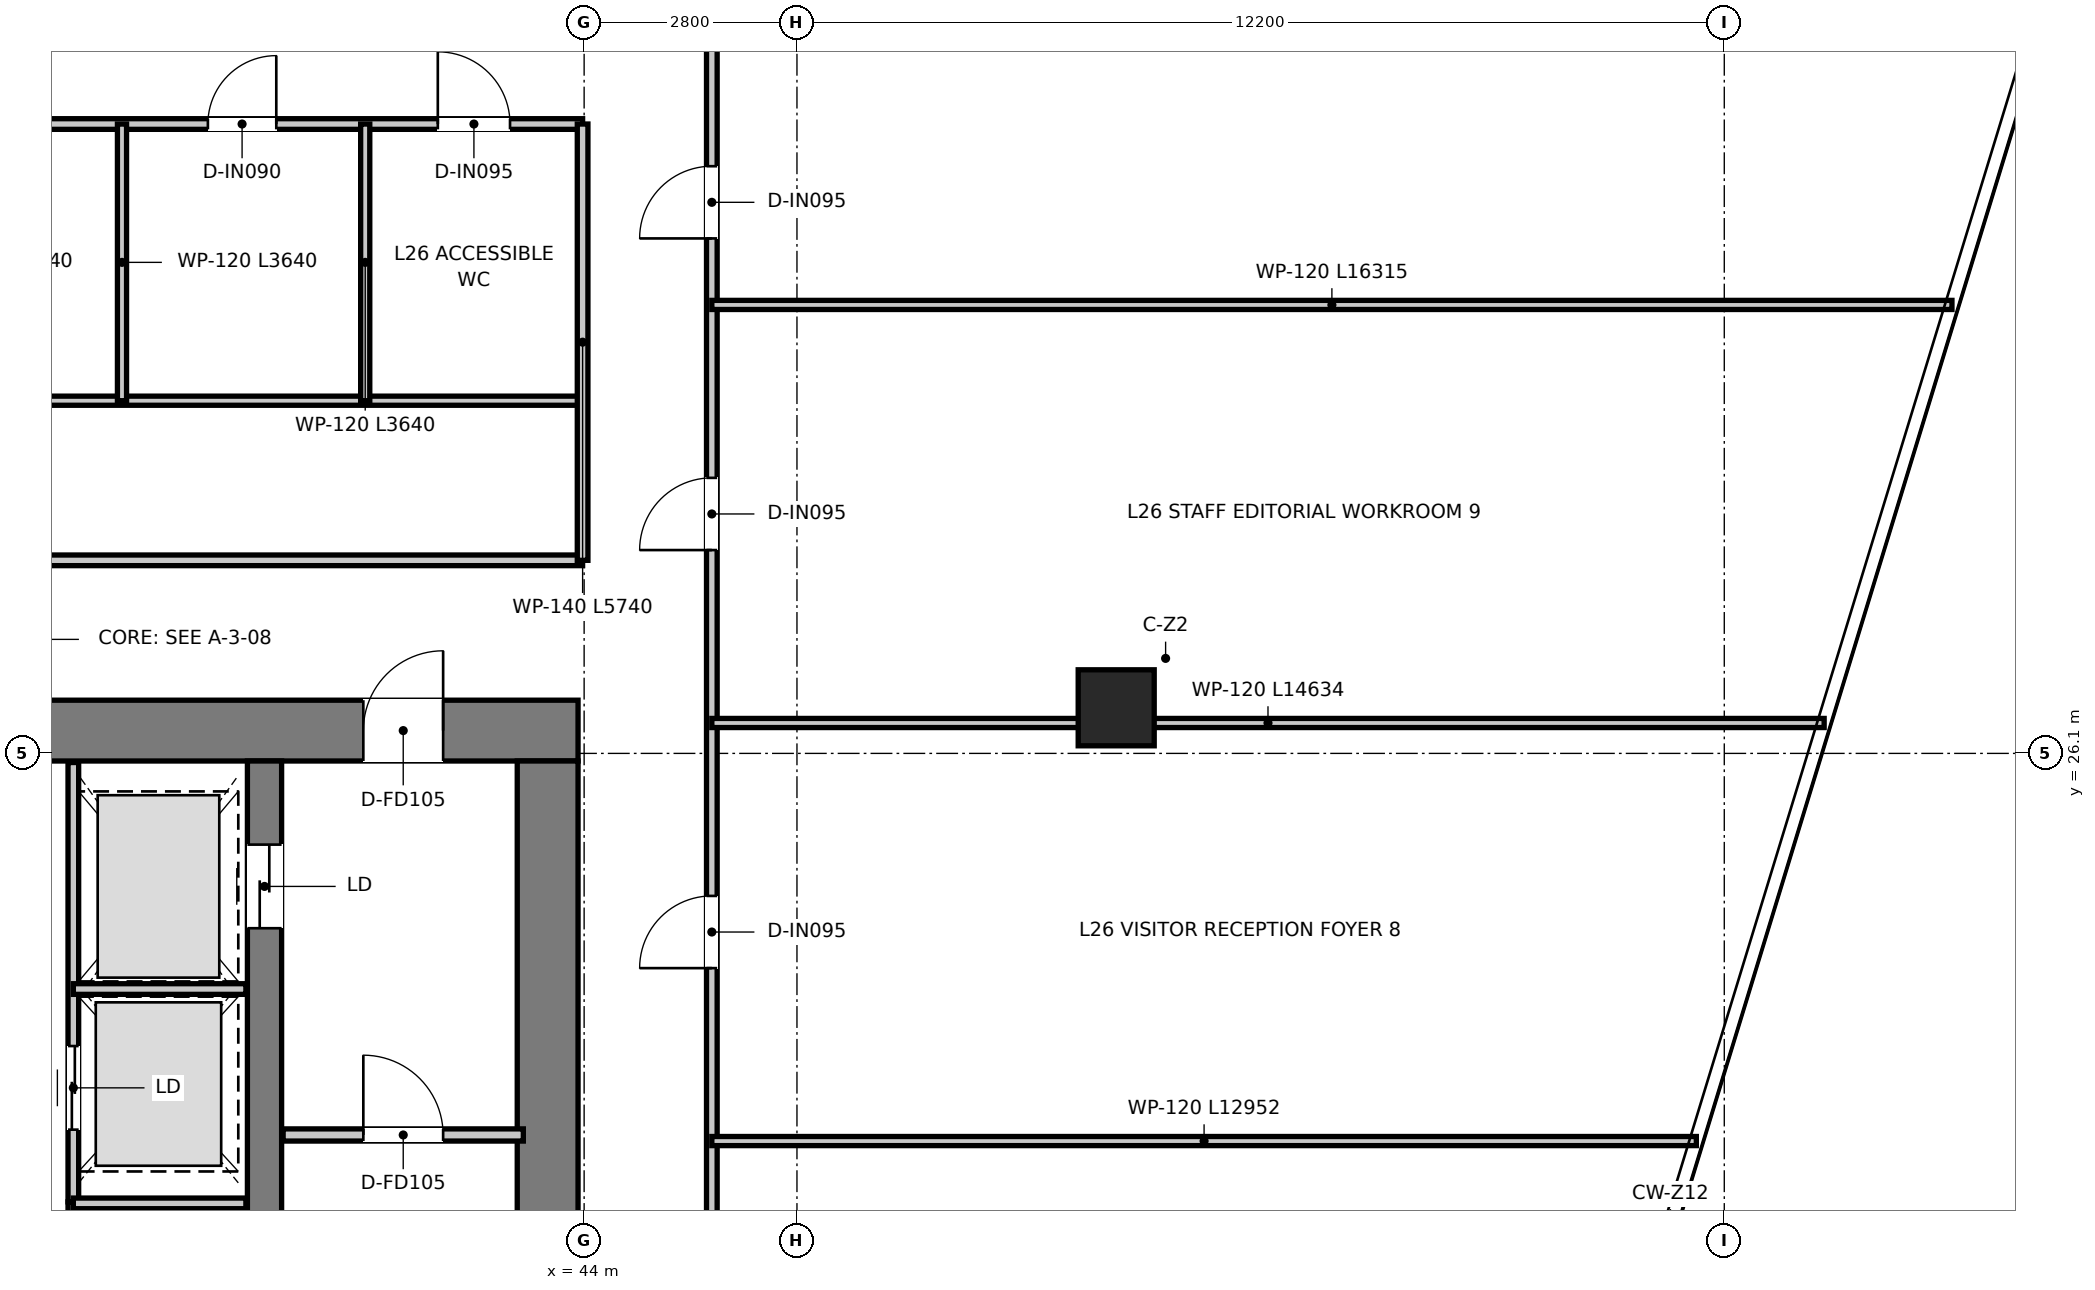
"""IFC4 building model, lengths in metres.
Left out: names, types, materials, properties, quantities, classifications, styles, units other than length and angle.
Written with IfcOpenShell. Run it as: python <this file> out.ifc"""

import sys

from ifc_helpers import new_model, si_unit, direction, frame, frame_2d, origin, origin_2d, place, context, subcontext, project, spatial, rectangle, extrude, source, transform, mapped, element, fill, save


model = new_model("IFC4")
c1 = context("Model", 3, precision=1e-05, world=origin(), true_north=direction((0.0, 1.0)))
c2 = subcontext(c1, "Body", "Model", "MODEL_VIEW")
j1 = project(units=[si_unit("LENGTHUNIT", "METRE"), si_unit("PLANEANGLEUNIT", "RADIAN")], contexts=[c1])
p1 = place(None, origin())
s1 = spatial("IfcSite", under=j1, at=p1, CompositionType="ELEMENT")
p2 = place(p1, origin())
s2 = spatial("IfcBuilding", under=s1, at=p2, CompositionType="ELEMENT")
p3 = place(p2, frame((0.0, 0.0, 109.8)))
s3 = spatial("IfcBuildingStorey", under=s2, at=p3, CompositionType="ELEMENT", Elevation=109.8)
p4 = place(p3, frame((28.08, 26.4, 0.0), z_axis=(0.0, 0.0, 1.0), x_axis=(1.0, 0.0, 0.0)))
e1 = element("IfcWall", 1, at=p4, inside=s3, PredefinedType="SHEAR", context=c2, shape_type="SweptSolid", body=[
    extrude(rectangle(XDim=15.84, YDim=0.8, at=frame_2d((7.92, 0.0))), origin(), (0.0, 0.0, 1.0), 3.95),
])
p5 = place(p4, frame((7.22, 0.0, 0.0)))
e2 = element("IfcOpeningElement", 2, at=p5, cuts=e1, PredefinedType="OPENING", context=c2, shape_type="SweptSolid", body=[
    extrude(rectangle(XDim=1.4, YDim=2.2, at=frame_2d((0.7, 1.1))), frame((0.0, 0.41, 0.0), z_axis=(0.0, -1.0, 0.0), x_axis=(1.0, 0.0, 0.0)), (0.0, 0.0, 1.0), 0.82),
])
p6 = place(p4, frame((1.775, 0.0, 0.0)))
e3 = element("IfcOpeningElement", 3, at=p6, cuts=e1, PredefinedType="OPENING", context=c2, shape_type="SweptSolid", body=[
    extrude(rectangle(XDim=1.05, YDim=2.1, at=frame_2d((0.525, 1.05))), frame((0.0, 0.41, 0.0), z_axis=(0.0, -1.0, 0.0), x_axis=(1.0, 0.0, 0.0)), (0.0, 0.0, 1.0), 0.82),
])
p7 = place(p4, frame((13.015, 0.0, 0.0)))
e4 = element("IfcOpeningElement", 4, at=p7, cuts=e1, PredefinedType="OPENING", context=c2, shape_type="SweptSolid", body=[
    extrude(rectangle(XDim=1.05, YDim=2.1, at=frame_2d((0.525, 1.05))), frame((0.0, 0.41, 0.0), z_axis=(0.0, -1.0, 0.0), x_axis=(1.0, 0.0, 0.0)), (0.0, 0.0, 1.0), 0.82),
])
p8 = place(p3, frame((43.52, 11.3, 0.0), z_axis=(0.0, 0.0, 1.0), x_axis=(0.0, 1.0, 0.0)))
e5 = element("IfcWall", 5, at=p8, inside=s3, PredefinedType="SHEAR", context=c2, shape_type="SweptSolid", body=[
    extrude(rectangle(XDim=14.7, YDim=0.8, at=frame_2d((7.35, 0.0))), origin(), (0.0, 0.0, 1.0), 3.95),
])
p9 = place(p3, frame((39.795, 13.22, 0.0), z_axis=(0.0, 0.0, 1.0), x_axis=(0.0, 1.0, 0.0)))
e6 = element("IfcWall", 6, at=p9, inside=s3, PredefinedType="SHEAR", context=c2, shape_type="SweptSolid", body=[
    extrude(rectangle(XDim=12.78, YDim=0.45, at=frame_2d((6.39, 0.0))), origin(), (0.0, 0.0, 1.0), 3.95),
])
p10 = place(p9, frame((10.58, 0.0, 0.0)))
e7 = element("IfcOpeningElement", 7, at=p10, cuts=e6, PredefinedType="OPENING", context=c2, shape_type="SweptSolid", body=[
    extrude(rectangle(XDim=1.1, YDim=2.15, at=frame_2d((0.55, 1.075))), frame((0.0, 0.235, 0.0), z_axis=(0.0, -1.0, 0.0), x_axis=(1.0, 0.0, 0.0)), (0.0, 0.0, 1.0), 0.47),
])
m1 = source(origin(), c2, "Body", "SweptSolid", [
    extrude(rectangle(XDim=1.0, YDim=1.0, at=origin_2d()), origin(), (0.0, 0.0, 1.0), 3.95),
])
p11 = place(p3, frame((51.0, 26.7, 0.0), z_axis=(0.0, 0.0, 1.0), x_axis=(1.0, 0.0, 0.0)))
e8 = element("IfcColumn", 8, at=p11, inside=s3, PredefinedType="COLUMN", context=c2, shape_type="MappedRepresentation", body=[
    mapped(m1, transform((0.0, 0.0, 0.0), x_axis=(1.0, 0.0, 0.0), y_axis=(0.0, 1.0, 0.0), z_axis=(0.0, 0.0, 1.0), scale=1.0)),
])
p12 = place(p3, frame((40.04, 21.08, 0.0), z_axis=(0.0, 0.0, 1.0), x_axis=(1.0, 0.0, 0.0)))
e9 = element("IfcWall", 9, at=p12, inside=s3, PredefinedType="PARTITIONING", context=c2, shape_type="SweptSolid", body=[
    extrude(rectangle(XDim=3.16, YDim=0.16, at=frame_2d((1.58, 0.0))), origin(), (0.0, 0.0, 1.0), 3.67),
])
p13 = place(p12, frame((1.055, 0.0, 0.0)))
e10 = element("IfcOpeningElement", 10, at=p13, cuts=e9, PredefinedType="OPENING", context=c2, shape_type="SweptSolid", body=[
    extrude(rectangle(XDim=1.05, YDim=2.1, at=frame_2d((0.525, 1.05))), frame((0.0, 0.09, 0.0), z_axis=(0.0, -1.0, 0.0), x_axis=(1.0, 0.0, 0.0)), (0.0, 0.0, 1.0), 0.18),
])
p14 = place(p3, frame((37.28, 20.2, 0.0), z_axis=(0.0, 0.0, 1.0), x_axis=(0.0, 1.0, 0.0)))
e11 = element("IfcWall", 11, at=p14, inside=s3, PredefinedType="PARTITIONING", context=c2, shape_type="SweptSolid", body=[
    extrude(rectangle(XDim=5.78, YDim=0.14, at=frame_2d((2.89, 0.0))), origin(), (0.0, 0.0, 1.0), 2.67),
])
p15 = place(p14, frame((0.95, 0.0, 0.0)))
e12 = element("IfcOpeningElement", 12, at=p15, cuts=e11, PredefinedType="OPENING", context=c2, shape_type="SweptSolid", body=[
    extrude(rectangle(XDim=1.1, YDim=2.15, at=frame_2d((0.55, 1.075))), frame((0.0, 0.08, 0.0), z_axis=(0.0, -1.0, 0.0), x_axis=(1.0, 0.0, 0.0)), (0.0, 0.0, 1.0), 0.16),
])
p16 = place(p3, frame((37.28, 23.0, 0.0), z_axis=(0.0, 0.0, 1.0), x_axis=(1.0, 0.0, 0.0)))
e13 = element("IfcWall", 13, at=p16, inside=s3, PredefinedType="PARTITIONING", context=c2, shape_type="SweptSolid", body=[
    extrude(rectangle(XDim=2.27, YDim=0.14, at=frame_2d((1.135, 0.0))), origin(), (0.0, 0.0, 1.0), 2.67),
])
p17 = place(p3, frame((37.28, 17.78, 0.0), z_axis=(0.0, 0.0, 1.0), x_axis=(0.0, 1.0, 0.0)))
e14 = element("IfcWall", 14, at=p17, inside=s3, PredefinedType="PARTITIONING", context=c2, shape_type="SweptSolid", body=[
    extrude(rectangle(XDim=2.42, YDim=0.14, at=frame_2d((1.21, 0.0))), origin(), (0.0, 0.0, 1.0), 3.67),
])
p18 = place(p3, frame((37.28, 20.18, 0.0), z_axis=(0.0, 0.0, 1.0), x_axis=(1.0, 0.0, 0.0)))
e15 = element("IfcWall", 15, at=p18, inside=s3, PredefinedType="PARTITIONING", context=c2, shape_type="SweptSolid", body=[
    extrude(rectangle(XDim=2.27, YDim=0.14, at=frame_2d((1.135, 0.0))), origin(), (0.0, 0.0, 1.0), 3.67),
])
p19 = place(p3, frame((28.02, 28.64, 0.0), z_axis=(0.0, 0.0, 1.0), x_axis=(1.0, 0.0, 0.0)))
e16 = element("IfcWall", 16, at=p19, inside=s3, PredefinedType="PARTITIONING", context=c2, shape_type="SweptSolid", body=[
    extrude(rectangle(XDim=15.96, YDim=0.14, at=frame_2d((7.98, 0.0))), origin(), (0.0, 0.0, 1.0), 3.08),
])
p20 = place(p19, frame((7.455, 0.0, 0.0)))
e17 = element("IfcOpeningElement", 17, at=p20, cuts=e16, PredefinedType="OPENING", context=c2, shape_type="SweptSolid", body=[
    extrude(rectangle(XDim=1.05, YDim=2.15, at=frame_2d((0.525, 1.075))), frame((0.0, 0.08, 0.0), z_axis=(0.0, -1.0, 0.0), x_axis=(1.0, 0.0, 0.0)), (0.0, 0.0, 1.0), 0.16),
])
p21 = place(p3, frame((28.02, 30.74, 0.0), z_axis=(0.0, 0.0, 1.0), x_axis=(1.0, 0.0, 0.0)))
e18 = element("IfcWall", 18, at=p21, inside=s3, PredefinedType="PARTITIONING", context=c2, shape_type="SweptSolid", body=[
    extrude(rectangle(XDim=15.96, YDim=0.12, at=frame_2d((7.98, 0.0))), origin(), (0.0, 0.0, 1.0), 3.08),
])
p22 = place(p3, frame((28.02, 34.38, 0.0), z_axis=(0.0, 0.0, 1.0), x_axis=(1.0, 0.0, 0.0)))
e19 = element("IfcWall", 19, at=p22, inside=s3, PredefinedType="PARTITIONING", context=c2, shape_type="SweptSolid", body=[
    extrude(rectangle(XDim=15.96, YDim=0.14, at=frame_2d((7.98, 0.0))), origin(), (0.0, 0.0, 1.0), 3.08),
])
p23 = place(p22, frame((7.83, 0.0, 0.0)))
e20 = element("IfcOpeningElement", 20, at=p23, cuts=e19, PredefinedType="OPENING", context=c2, shape_type="SweptSolid", body=[
    extrude(rectangle(XDim=0.9, YDim=2.1, at=frame_2d((0.45, 1.05))), frame((0.0, 0.08, 0.0), z_axis=(0.0, -1.0, 0.0), x_axis=(1.0, 0.0, 0.0)), (0.0, 0.0, 1.0), 0.16),
])
p24 = place(p22, frame((11.03, 0.0, 0.0)))
e21 = element("IfcOpeningElement", 21, at=p24, cuts=e19, PredefinedType="OPENING", context=c2, shape_type="SweptSolid", body=[
    extrude(rectangle(XDim=0.9, YDim=2.1, at=frame_2d((0.45, 1.05))), frame((0.0, 0.08, 0.0), z_axis=(0.0, -1.0, 0.0), x_axis=(1.0, 0.0, 0.0)), (0.0, 0.0, 1.0), 0.16),
])
p25 = place(p22, frame((14.055, 0.0, 0.0)))
e22 = element("IfcOpeningElement", 22, at=p25, cuts=e19, PredefinedType="OPENING", context=c2, shape_type="SweptSolid", body=[
    extrude(rectangle(XDim=0.95, YDim=2.1, at=frame_2d((0.475, 1.05))), frame((0.0, 0.08, 0.0), z_axis=(0.0, -1.0, 0.0), x_axis=(1.0, 0.0, 0.0)), (0.0, 0.0, 1.0), 0.16),
])
p26 = place(p22, frame((2.855, 0.0, 0.0)))
e23 = element("IfcOpeningElement", 23, at=p26, cuts=e19, PredefinedType="OPENING", context=c2, shape_type="SweptSolid", body=[
    extrude(rectangle(XDim=0.95, YDim=2.1, at=frame_2d((0.475, 1.05))), frame((0.0, 0.08, 0.0), z_axis=(0.0, -1.0, 0.0), x_axis=(1.0, 0.0, 0.0)), (0.0, 0.0, 1.0), 0.16),
])
p27 = place(p3, frame((43.98, 28.64, 0.0), z_axis=(0.0, 0.0, 1.0), x_axis=(0.0, 1.0, 0.0)))
e24 = element("IfcWall", 24, at=p27, inside=s3, PredefinedType="PARTITIONING", context=c2, shape_type="SweptSolid", body=[
    extrude(rectangle(XDim=5.74, YDim=0.14, at=frame_2d((2.87, 0.0))), origin(), (0.0, 0.0, 1.0), 3.27),
])
for number, where, z_axis, x_axis in (
    (25, (37.92, 30.74, 0.0), (0.0, 0.0, 1.0), (0.0, 1.0, 0.0)),
    (26, (41.12, 30.74, 0.0), (0.0, 0.0, 1.0), (0.0, 1.0, 0.0)),
):
    element("IfcWall", number, at=place(p3, frame(where, z_axis=z_axis, x_axis=x_axis)), inside=s3, PredefinedType="PARTITIONING", context=c2, shape_type="SweptSolid", body=[
        extrude(rectangle(XDim=3.64, YDim=0.12, at=frame_2d((1.82, 0.0))), origin(), (0.0, 0.0, 1.0), 3.17),
    ])
p28 = place(p3, frame((45.68, 10.5, 0.0), z_axis=(0.0, 0.0, 1.0), x_axis=(0.0, 1.0, 0.0)))
e27 = element("IfcWall", 27, at=p28, inside=s3, PredefinedType="PARTITIONING", context=c2, shape_type="SweptSolid", body=[
    extrude(rectangle(XDim=25.62, YDim=0.14, at=frame_2d((12.81, 0.0))), origin(), (0.0, 0.0, 1.0), 2.97),
])
p29 = place(p28, frame((8.275, 0.0, 0.0)))
e28 = element("IfcOpeningElement", 28, at=p29, cuts=e27, PredefinedType="OPENING", context=c2, shape_type="SweptSolid", body=[
    extrude(rectangle(XDim=0.95, YDim=2.1, at=frame_2d((0.475, 1.05))), frame((0.0, 0.08, 0.0), z_axis=(0.0, -1.0, 0.0), x_axis=(1.0, 0.0, 0.0)), (0.0, 0.0, 1.0), 0.16),
])
p30 = place(p28, frame((12.775, 0.0, 0.0)))
e29 = element("IfcOpeningElement", 29, at=p30, cuts=e27, PredefinedType="OPENING", context=c2, shape_type="SweptSolid", body=[
    extrude(rectangle(XDim=0.95, YDim=2.1, at=frame_2d((0.475, 1.05))), frame((0.0, 0.08, 0.0), z_axis=(0.0, -1.0, 0.0), x_axis=(1.0, 0.0, 0.0)), (0.0, 0.0, 1.0), 0.16),
])
p31 = place(p28, frame((18.275, 0.0, 0.0)))
e30 = element("IfcOpeningElement", 30, at=p31, cuts=e27, PredefinedType="OPENING", context=c2, shape_type="SweptSolid", body=[
    extrude(rectangle(XDim=0.95, YDim=2.1, at=frame_2d((0.475, 1.05))), frame((0.0, 0.08, 0.0), z_axis=(0.0, -1.0, 0.0), x_axis=(1.0, 0.0, 0.0)), (0.0, 0.0, 1.0), 0.16),
])
p32 = place(p28, frame((22.375, 0.0, 0.0)))
e31 = element("IfcOpeningElement", 31, at=p32, cuts=e27, PredefinedType="OPENING", context=c2, shape_type="SweptSolid", body=[
    extrude(rectangle(XDim=0.95, YDim=2.1, at=frame_2d((0.475, 1.05))), frame((0.0, 0.08, 0.0), z_axis=(0.0, -1.0, 0.0), x_axis=(1.0, 0.0, 0.0)), (0.0, 0.0, 1.0), 0.16),
])
p33 = place(p3, frame((45.68, 21.0, 0.0), z_axis=(0.0, 0.0, 1.0), x_axis=(1.0, 0.0, 0.0)))
e32 = element("IfcWall", 32, at=p33, inside=s3, PredefinedType="PARTITIONING", context=c2, shape_type="SweptSolid", body=[
    extrude(rectangle(XDim=12.952, YDim=0.12, at=frame_2d((6.476, 0.0))), origin(), (0.0, 0.0, 1.0), 2.97),
])
p34 = place(p3, frame((45.68, 26.5, 0.0), z_axis=(0.0, 0.0, 1.0), x_axis=(1.0, 0.0, 0.0)))
e33 = element("IfcWall", 33, at=p34, inside=s3, PredefinedType="PARTITIONING", context=c2, shape_type="SweptSolid", body=[
    extrude(rectangle(XDim=14.634, YDim=0.12, at=frame_2d((7.317, 0.0))), origin(), (0.0, 0.0, 1.0), 2.97),
])
p35 = place(p3, frame((45.68, 32.0, 0.0), z_axis=(0.0, 0.0, 1.0), x_axis=(1.0, 0.0, 0.0)))
e34 = element("IfcWall", 34, at=p35, inside=s3, PredefinedType="PARTITIONING", context=c2, shape_type="SweptSolid", body=[
    extrude(rectangle(XDim=16.315, YDim=0.12, at=frame_2d((8.158, 0.0))), origin(), (0.0, 0.0, 1.0), 2.97),
])
p36 = place(p13, origin())
e35 = element("IfcDoor", 35, at=p36, inside=s3, OperationType="SINGLE_SWING_LEFT", PredefinedType="DOOR", context=c2, shape_type="SweptSolid", body=[
    extrude(rectangle(XDim=1.05, YDim=2.1, at=frame_2d((0.525, 1.05))), frame((0.0, 0.025, 0.0), z_axis=(0.0, -1.0, 0.0), x_axis=(1.0, 0.0, 0.0)), (0.0, 0.0, 1.0), 0.05),
])
fill(e10, e35)
p37 = place(p7, origin())
e36 = element("IfcDoor", 36, at=p37, inside=s3, OperationType="SINGLE_SWING_RIGHT", PredefinedType="DOOR", context=c2, shape_type="SweptSolid", body=[
    extrude(rectangle(XDim=1.05, YDim=2.1, at=frame_2d((0.525, 1.05))), frame((0.0, 0.025, 0.0), z_axis=(0.0, -1.0, 0.0), x_axis=(1.0, 0.0, 0.0)), (0.0, 0.0, 1.0), 0.05),
])
fill(e4, e36)
p38 = place(p10, origin())
e37 = element("IfcDoor", 37, at=p38, inside=s3, OperationType="DOUBLE_DOOR_SLIDING", PredefinedType="DOOR", context=c2, shape_type="SweptSolid", body=[
    extrude(rectangle(XDim=1.1, YDim=2.15, at=frame_2d((0.55, 1.075))), frame((0.0, 0.025, 0.0), z_axis=(0.0, -1.0, 0.0), x_axis=(1.0, 0.0, 0.0)), (0.0, 0.0, 1.0), 0.05),
])
fill(e7, e37)
p39 = place(p15, origin())
e38 = element("IfcDoor", 38, at=p39, inside=s3, OperationType="DOUBLE_DOOR_SLIDING", PredefinedType="DOOR", context=c2, shape_type="SweptSolid", body=[
    extrude(rectangle(XDim=1.1, YDim=2.15, at=frame_2d((0.55, 1.075))), frame((0.0, 0.025, 0.0), z_axis=(0.0, -1.0, 0.0), x_axis=(1.0, 0.0, 0.0)), (0.0, 0.0, 1.0), 0.05),
])
fill(e12, e38)
p40 = place(p24, origin())
e39 = element("IfcDoor", 39, at=p40, inside=s3, OperationType="SINGLE_SWING_RIGHT", PredefinedType="DOOR", context=c2, shape_type="SweptSolid", body=[
    extrude(rectangle(XDim=0.9, YDim=2.1, at=frame_2d((0.45, 1.05))), frame((0.0, 0.025, 0.0), z_axis=(0.0, -1.0, 0.0), x_axis=(1.0, 0.0, 0.0)), (0.0, 0.0, 1.0), 0.05),
])
fill(e21, e39)
p41 = place(p25, origin())
e40 = element("IfcDoor", 40, at=p41, inside=s3, OperationType="SINGLE_SWING_LEFT", PredefinedType="DOOR", context=c2, shape_type="SweptSolid", body=[
    extrude(rectangle(XDim=0.95, YDim=2.1, at=frame_2d((0.475, 1.05))), frame((0.0, 0.025, 0.0), z_axis=(0.0, -1.0, 0.0), x_axis=(1.0, 0.0, 0.0)), (0.0, 0.0, 1.0), 0.05),
])
fill(e22, e40)
p42 = place(p30, origin())
e41 = element("IfcDoor", 41, at=p42, inside=s3, OperationType="SINGLE_SWING_LEFT", PredefinedType="DOOR", context=c2, shape_type="SweptSolid", body=[
    extrude(rectangle(XDim=0.95, YDim=2.1, at=frame_2d((0.475, 1.05))), frame((0.0, 0.025, 0.0), z_axis=(0.0, -1.0, 0.0), x_axis=(1.0, 0.0, 0.0)), (0.0, 0.0, 1.0), 0.05),
])
fill(e29, e41)
p43 = place(p31, origin())
e42 = element("IfcDoor", 42, at=p43, inside=s3, OperationType="SINGLE_SWING_LEFT", PredefinedType="DOOR", context=c2, shape_type="SweptSolid", body=[
    extrude(rectangle(XDim=0.95, YDim=2.1, at=frame_2d((0.475, 1.05))), frame((0.0, 0.025, 0.0), z_axis=(0.0, -1.0, 0.0), x_axis=(1.0, 0.0, 0.0)), (0.0, 0.0, 1.0), 0.05),
])
fill(e30, e42)
p44 = place(p32, origin())
e43 = element("IfcDoor", 43, at=p44, inside=s3, OperationType="SINGLE_SWING_LEFT", PredefinedType="DOOR", context=c2, shape_type="SweptSolid", body=[
    extrude(rectangle(XDim=0.95, YDim=2.1, at=frame_2d((0.475, 1.05))), frame((0.0, 0.025, 0.0), z_axis=(0.0, -1.0, 0.0), x_axis=(1.0, 0.0, 0.0)), (0.0, 0.0, 1.0), 0.05),
])
fill(e31, e43)
save(model, sys.argv[1])
